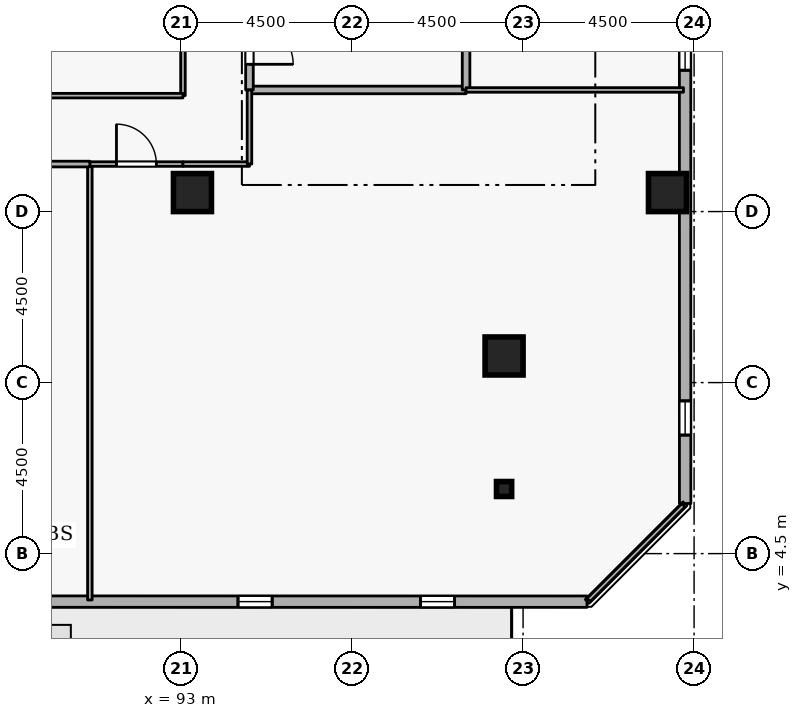
"""IFC4 building model, lengths in metres.
Left out: names, types, materials, properties, quantities, classifications, styles, units other than length and angle.
Written with IfcOpenShell. Run it as: python <this file> out.ifc"""

import sys

from ifc_helpers import new_model, si_unit, direction, frame, frame_2d, origin, origin_2d, place, context, subcontext, project, spatial, rectangle, i_section, extrude, element, fill, save


model = new_model("IFC4")
c1 = context("Model", 3, precision=1e-05, world=origin(), true_north=direction((0.0, 1.0)))
c2 = subcontext(c1, "Body", "Model", "MODEL_VIEW")
j1 = project(units=[si_unit("LENGTHUNIT", "METRE"), si_unit("PLANEANGLEUNIT", "RADIAN")], contexts=[c1])
p1 = place(None, origin())
s1 = spatial("IfcSite", under=j1, at=p1, CompositionType="ELEMENT")
p2 = place(p1, origin())
s2 = spatial("IfcBuilding", under=s1, at=p2, CompositionType="ELEMENT")
p3 = place(p2, frame((0.0, 0.0, 203.7)))
s3 = spatial("IfcBuildingStorey", under=s2, at=p3, CompositionType="ELEMENT", Elevation=203.7)
for number, where, z_axis, x_axis in (
    (1, (105.8, 14.0, 0.0), (0.0, 0.0, 1.0), (1.0, 0.0, 0.0)),
    (2, (101.5, 9.7, 0.0), (0.0, 0.0, 1.0), (1.0, 0.0, 0.0)),
    (3, (93.3, 14.0, 0.0), (0.0, 0.0, 1.0), (1.0, 0.0, 0.0)),
):
    element("IfcColumn", number, at=place(p3, frame(where, z_axis=z_axis, x_axis=x_axis)), inside=s3, PredefinedType="COLUMN", context=c2, shape_type="SweptSolid", body=[
        extrude(rectangle(XDim=1.0, YDim=1.0, at=origin_2d()), origin(), (0.0, 0.0, 1.0), 3.6),
    ])
p4 = place(p3, frame((101.5, 6.2, 0.0), z_axis=(0.0, 0.0, 1.0), x_axis=(1.0, 0.0, 0.0)))
e4 = element("IfcColumn", 4, at=p4, inside=s3, PredefinedType="COLUMN", context=c2, shape_type="SweptSolid", body=[
    extrude(i_section(OverallWidth=0.399, OverallDepth=0.394, WebThickness=0.023, FlangeThickness=0.037, FilletRadius=0.015, at=origin_2d()), origin(), (0.0, 0.0, 1.0), 3.6),
])
p5 = place(p3, frame((68.698, 3.24, 0.0), z_axis=(0.0, 0.0, 1.0), x_axis=(0.999999991209, -0.000132597301, 0.0)))
e5 = element("IfcWall", 5, at=p5, inside=s3, PredefinedType="STANDARD", context=c2, shape_type="SweptSolid", body=[
    extrude(rectangle(XDim=34.983, YDim=0.3, at=frame_2d((17.492, 0.0))), origin(), (0.0, 0.0, 1.0), 2.7),
])
p6 = place(p5, frame((19.292, 0.0, 0.0)))
e6 = element("IfcOpeningElement", 6, at=p6, cuts=e5, PredefinedType="OPENING", context=c2, shape_type="SweptSolid", body=[
    extrude(rectangle(XDim=1.0, YDim=2.08, at=frame_2d((0.5, 1.04))), frame((0.0, 0.16, 0.0), z_axis=(0.0, -1.0, 0.0), x_axis=(1.0, 0.0, 0.0)), (0.0, 0.0, 1.0), 0.32),
])
p7 = place(p5, frame((1.8, 0.0, 0.72)))
e7 = element("IfcOpeningElement", 7, at=p7, cuts=e5, PredefinedType="OPENING", context=c2, shape_type="SweptSolid", body=[
    extrude(rectangle(XDim=0.9, YDim=1.75, at=frame_2d((0.45, 0.875))), frame((0.0, 0.16, 0.0), z_axis=(0.0, -1.0, 0.0), x_axis=(1.0, 0.0, 0.0)), (0.0, 0.0, 1.0), 0.32),
])
p8 = place(p5, frame((6.6, 0.0, 0.72)))
e8 = element("IfcOpeningElement", 8, at=p8, cuts=e5, PredefinedType="OPENING", context=c2, shape_type="SweptSolid", body=[
    extrude(rectangle(XDim=0.9, YDim=1.75, at=frame_2d((0.45, 0.875))), frame((0.0, 0.16, 0.0), z_axis=(0.0, -1.0, 0.0), x_axis=(1.0, 0.0, 0.0)), (0.0, 0.0, 1.0), 0.32),
])
p9 = place(p5, frame((11.4, 0.0, 0.72)))
e9 = element("IfcOpeningElement", 9, at=p9, cuts=e5, PredefinedType="OPENING", context=c2, shape_type="SweptSolid", body=[
    extrude(rectangle(XDim=0.9, YDim=1.75, at=frame_2d((0.45, 0.875))), frame((0.0, 0.16, 0.0), z_axis=(0.0, -1.0, 0.0), x_axis=(1.0, 0.0, 0.0)), (0.0, 0.0, 1.0), 0.32),
])
p10 = place(p5, frame((16.2, 0.0, 0.72)))
e10 = element("IfcOpeningElement", 10, at=p10, cuts=e5, PredefinedType="OPENING", context=c2, shape_type="SweptSolid", body=[
    extrude(rectangle(XDim=0.9, YDim=1.75, at=frame_2d((0.45, 0.875))), frame((0.0, 0.16, 0.0), z_axis=(0.0, -1.0, 0.0), x_axis=(1.0, 0.0, 0.0)), (0.0, 0.0, 1.0), 0.32),
])
p11 = place(p5, frame((25.8, 0.0, 0.72)))
e11 = element("IfcOpeningElement", 11, at=p11, cuts=e5, PredefinedType="OPENING", context=c2, shape_type="SweptSolid", body=[
    extrude(rectangle(XDim=0.9, YDim=1.75, at=frame_2d((0.45, 0.875))), frame((0.0, 0.16, 0.0), z_axis=(0.0, -1.0, 0.0), x_axis=(1.0, 0.0, 0.0)), (0.0, 0.0, 1.0), 0.32),
])
p12 = place(p5, frame((30.6, 0.0, 0.72)))
e12 = element("IfcOpeningElement", 12, at=p12, cuts=e5, PredefinedType="OPENING", context=c2, shape_type="SweptSolid", body=[
    extrude(rectangle(XDim=0.9, YDim=1.75, at=frame_2d((0.45, 0.875))), frame((0.0, 0.16, 0.0), z_axis=(0.0, -1.0, 0.0), x_axis=(1.0, 0.0, 0.0)), (0.0, 0.0, 1.0), 0.32),
])
p13 = place(p3, frame((106.265, 5.819, 0.0), z_axis=(0.0, 0.0, 1.0), x_axis=(-0.000132597301, 0.999999991209, 0.0)))
e13 = element("IfcWall", 13, at=p13, inside=s3, PredefinedType="STANDARD", context=c2, shape_type="SweptSolid", body=[
    extrude(rectangle(XDim=34.983, YDim=0.3, at=frame_2d((17.492, 0.0))), origin(), (0.0, 0.0, 1.0), 2.7),
])
p14 = place(p13, frame((1.8, 0.0, 0.72)))
e14 = element("IfcOpeningElement", 14, at=p14, cuts=e13, PredefinedType="OPENING", context=c2, shape_type="SweptSolid", body=[
    extrude(rectangle(XDim=0.9, YDim=1.75, at=frame_2d((0.45, 0.875))), frame((0.0, 0.16, 0.0), z_axis=(0.0, -1.0, 0.0), x_axis=(1.0, 0.0, 0.0)), (0.0, 0.0, 1.0), 0.32),
])
p15 = place(p13, frame((11.4, 0.0, 0.72)))
e15 = element("IfcOpeningElement", 15, at=p15, cuts=e13, PredefinedType="OPENING", context=c2, shape_type="SweptSolid", body=[
    extrude(rectangle(XDim=0.9, YDim=1.75, at=frame_2d((0.45, 0.875))), frame((0.0, 0.16, 0.0), z_axis=(0.0, -1.0, 0.0), x_axis=(1.0, 0.0, 0.0)), (0.0, 0.0, 1.0), 0.32),
])
p16 = place(p13, frame((16.2, 0.0, 0.72)))
e16 = element("IfcOpeningElement", 16, at=p16, cuts=e13, PredefinedType="OPENING", context=c2, shape_type="SweptSolid", body=[
    extrude(rectangle(XDim=0.9, YDim=1.75, at=frame_2d((0.45, 0.875))), frame((0.0, 0.16, 0.0), z_axis=(0.0, -1.0, 0.0), x_axis=(1.0, 0.0, 0.0)), (0.0, 0.0, 1.0), 0.32),
])
p17 = place(p13, frame((25.8, 0.0, 0.72)))
e17 = element("IfcOpeningElement", 17, at=p17, cuts=e13, PredefinedType="OPENING", context=c2, shape_type="SweptSolid", body=[
    extrude(rectangle(XDim=0.9, YDim=1.75, at=frame_2d((0.45, 0.875))), frame((0.0, 0.16, 0.0), z_axis=(0.0, -1.0, 0.0), x_axis=(1.0, 0.0, 0.0)), (0.0, 0.0, 1.0), 0.32),
])
p18 = place(p3, frame((94.8, 16.7, 0.0), z_axis=(0.0, 0.0, 1.0), x_axis=(1.0, 0.0, 0.0)))
e18 = element("IfcWall", 18, at=p18, inside=s3, PredefinedType="STANDARD", context=c2, shape_type="SweptSolid", body=[
    extrude(rectangle(XDim=5.7, YDim=0.2, at=frame_2d((2.85, 0.0))), origin(), (0.0, 0.0, 1.0), 3.34),
])
p19 = place(p3, frame((100.5, 16.7, 0.0), z_axis=(0.0, 0.0, 1.0), x_axis=(0.0, 1.0, 0.0)))
e19 = element("IfcWall", 19, at=p19, inside=s3, PredefinedType="STANDARD", context=c2, shape_type="SweptSolid", body=[
    extrude(rectangle(XDim=2.5, YDim=0.2, at=frame_2d((1.25, 0.0))), origin(), (0.0, 0.0, 1.0), 3.34),
])
p20 = place(p3, frame((94.8, 19.2, 0.0), z_axis=(0.0, 0.0, 1.0), x_axis=(0.0, -1.0, 0.0)))
e20 = element("IfcWall", 20, at=p20, inside=s3, PredefinedType="STANDARD", context=c2, shape_type="SweptSolid", body=[
    extrude(rectangle(XDim=2.5, YDim=0.2, at=frame_2d((1.25, 0.0))), origin(), (0.0, 0.0, 1.0), 3.34),
])
p21 = place(p20, frame((0.675, 0.0, 0.0)))
e21 = element("IfcOpeningElement", 21, at=p21, cuts=e20, PredefinedType="OPENING", context=c2, shape_type="SweptSolid", body=[
    extrude(rectangle(XDim=1.15, YDim=2.1, at=frame_2d((0.575, 1.05))), frame((0.0, 0.11, 0.0), z_axis=(0.0, -1.0, 0.0), x_axis=(1.0, 0.0, 0.0)), (0.0, 0.0, 1.0), 0.22),
])
p22 = place(p3, frame((90.6, 3.28, 0.0), z_axis=(0.0, 0.0, 1.0), x_axis=(0.0, 1.0, 0.0)))
e22 = element("IfcWall", 22, at=p22, inside=s3, PredefinedType="PARTITIONING", context=c2, shape_type="SweptSolid", body=[
    extrude(rectangle(XDim=11.47, YDim=0.12, at=frame_2d((5.735, 0.0))), origin(), (0.0, 0.0, 1.0), 3.34),
])
p23 = place(p3, frame((90.6, 14.75, 0.0), z_axis=(0.0, 0.0, 1.0), x_axis=(1.0, 0.0, 0.0)))
e23 = element("IfcWall", 23, at=p23, inside=s3, PredefinedType="PARTITIONING", context=c2, shape_type="SweptSolid", body=[
    extrude(rectangle(XDim=2.45, YDim=0.12, at=frame_2d((1.225, 0.0))), origin(), (0.0, 0.0, 1.0), 3.34),
])
p24 = place(p23, frame((0.7, 0.0, 0.0)))
e24 = element("IfcOpeningElement", 24, at=p24, cuts=e23, PredefinedType="OPENING", context=c2, shape_type="SweptSolid", body=[
    extrude(rectangle(XDim=1.05, YDim=2.1, at=frame_2d((0.525, 1.05))), frame((0.0, 0.07, 0.0), z_axis=(0.0, -1.0, 0.0), x_axis=(1.0, 0.0, 0.0)), (0.0, 0.0, 1.0), 0.14),
])
p25 = place(p3, frame((93.05, 14.75, 0.0), z_axis=(0.0, 0.0, 1.0), x_axis=(1.0, 0.0, 0.0)))
e25 = element("IfcWall", 25, at=p25, inside=s3, PredefinedType="PARTITIONING", context=c2, shape_type="SweptSolid", body=[
    extrude(rectangle(XDim=1.75, YDim=0.12, at=frame_2d((0.875, 0.0))), origin(), (0.0, 0.0, 1.0), 3.34),
])
p26 = place(p3, frame((94.8, 14.75, 0.0), z_axis=(0.0, 0.0, 1.0), x_axis=(0.0, 1.0, 0.0)))
e26 = element("IfcWall", 26, at=p26, inside=s3, PredefinedType="PARTITIONING", context=c2, shape_type="SweptSolid", body=[
    extrude(rectangle(XDim=1.95, YDim=0.12, at=frame_2d((0.975, 0.0))), origin(), (0.0, 0.0, 1.0), 3.34),
])
p27 = place(p3, frame((100.5, 16.7, 0.0), z_axis=(0.0, 0.0, 1.0), x_axis=(1.0, 0.0, 0.0)))
e27 = element("IfcWall", 27, at=p27, inside=s3, PredefinedType="PARTITIONING", context=c2, shape_type="SweptSolid", body=[
    extrude(rectangle(XDim=5.72, YDim=0.12, at=frame_2d((2.86, 0.0))), origin(), (0.0, 0.0, 1.0), 3.34),
])
p28 = place(p3, frame((106.22, 5.775, 0.0), z_axis=(0.0, 0.0, 1.0), x_axis=(-0.707106781187, -0.707106781187, 0.0)))
e28 = element("IfcWall", 28, at=p28, inside=s3, PredefinedType="PARTITIONING", context=c2, shape_type="SweptSolid", body=[
    extrude(rectangle(XDim=3.528, YDim=0.12, at=frame_2d((1.764, 0.0))), origin(), (0.0, 0.0, 1.0), 3.34),
])
p29 = place(p3, frame((86.4, 14.75, 0.0), z_axis=(0.0, 0.0, 1.0), x_axis=(1.0, 0.0, 0.0)))
e29 = element("IfcWall", 29, at=p29, inside=s3, PredefinedType="PARTITIONING", context=c2, shape_type="SweptSolid", body=[
    extrude(rectangle(XDim=4.2, YDim=0.15, at=frame_2d((2.1, 0.0))), origin(), (0.0, 0.0, 1.0), 3.34),
])
p30 = place(p29, frame((1.45, 0.0, 0.0)))
e30 = element("IfcOpeningElement", 30, at=p30, cuts=e29, PredefinedType="OPENING", context=c2, shape_type="SweptSolid", body=[
    extrude(rectangle(XDim=1.3, YDim=2.12, at=frame_2d((0.65, 1.06))), frame((0.0, 0.085, 0.0), z_axis=(0.0, -1.0, 0.0), x_axis=(1.0, 0.0, 0.0)), (0.0, 0.0, 1.0), 0.17),
])
p31 = place(p3, frame((93.05, 22.4, 0.0), z_axis=(0.0, 0.0, 1.0), x_axis=(0.0, -1.0, 0.0)))
e31 = element("IfcWall", 31, at=p31, inside=s3, PredefinedType="PARTITIONING", context=c2, shape_type="SweptSolid", body=[
    extrude(rectangle(XDim=5.85, YDim=0.12, at=frame_2d((2.925, 0.0))), origin(), (0.0, 0.0, 1.0), 3.34),
])
p32 = place(p3, frame((93.05, 16.55, 0.0), z_axis=(0.0, 0.0, 1.0), x_axis=(-1.0, 0.0, 0.0)))
e32 = element("IfcWall", 32, at=p32, inside=s3, PredefinedType="PARTITIONING", context=c2, shape_type="SweptSolid", body=[
    extrude(rectangle(XDim=9.1, YDim=0.12, at=frame_2d((4.55, 0.0))), origin(), (0.0, 0.0, 1.0), 3.34),
])
p33 = place(p32, frame((4.075, 0.0, 0.0)))
e33 = element("IfcOpeningElement", 33, at=p33, cuts=e32, PredefinedType="OPENING", context=c2, shape_type="SweptSolid", body=[
    extrude(rectangle(XDim=0.95, YDim=2.1, at=frame_2d((0.475, 1.05))), frame((0.0, 0.07, 0.0), z_axis=(0.0, -1.0, 0.0), x_axis=(1.0, 0.0, 0.0)), (0.0, 0.0, 1.0), 0.14),
])
p34 = place(p11, origin())
e34 = element("IfcWindow", 34, at=p34, inside=s3, PartitioningType="SINGLE_PANEL", PredefinedType="WINDOW", context=c2, shape_type="SweptSolid", body=[
    extrude(rectangle(XDim=0.9, YDim=1.75, at=frame_2d((0.45, 0.875))), frame((0.0, 0.03, 0.0), z_axis=(0.0, -1.0, 0.0), x_axis=(1.0, 0.0, 0.0)), (0.0, 0.0, 1.0), 0.06),
])
fill(e11, e34)
p35 = place(p12, origin())
e35 = element("IfcWindow", 35, at=p35, inside=s3, PartitioningType="SINGLE_PANEL", PredefinedType="WINDOW", context=c2, shape_type="SweptSolid", body=[
    extrude(rectangle(XDim=0.9, YDim=1.75, at=frame_2d((0.45, 0.875))), frame((0.0, 0.03, 0.0), z_axis=(0.0, -1.0, 0.0), x_axis=(1.0, 0.0, 0.0)), (0.0, 0.0, 1.0), 0.06),
])
fill(e12, e35)
p36 = place(p14, origin())
e36 = element("IfcWindow", 36, at=p36, inside=s3, PartitioningType="SINGLE_PANEL", PredefinedType="WINDOW", context=c2, shape_type="SweptSolid", body=[
    extrude(rectangle(XDim=0.9, YDim=1.75, at=frame_2d((0.45, 0.875))), frame((0.0, 0.03, 0.0), z_axis=(0.0, -1.0, 0.0), x_axis=(1.0, 0.0, 0.0)), (0.0, 0.0, 1.0), 0.06),
])
fill(e14, e36)
p37 = place(p15, origin())
e37 = element("IfcWindow", 37, at=p37, inside=s3, PartitioningType="SINGLE_PANEL", PredefinedType="WINDOW", context=c2, shape_type="SweptSolid", body=[
    extrude(rectangle(XDim=0.9, YDim=1.75, at=frame_2d((0.45, 0.875))), frame((0.0, 0.03, 0.0), z_axis=(0.0, -1.0, 0.0), x_axis=(1.0, 0.0, 0.0)), (0.0, 0.0, 1.0), 0.06),
])
fill(e15, e37)
p38 = place(p21, origin())
e38 = element("IfcDoor", 38, at=p38, inside=s3, OperationType="SINGLE_SWING_RIGHT", PredefinedType="DOOR", context=c2, shape_type="SweptSolid", body=[
    extrude(rectangle(XDim=1.15, YDim=2.1, at=frame_2d((0.575, 1.05))), frame((0.0, 0.025, 0.0), z_axis=(0.0, -1.0, 0.0), x_axis=(1.0, 0.0, 0.0)), (0.0, 0.0, 1.0), 0.05),
])
fill(e21, e38)
p39 = place(p24, origin())
e39 = element("IfcDoor", 39, at=p39, inside=s3, OperationType="SINGLE_SWING_LEFT", PredefinedType="DOOR", context=c2, shape_type="SweptSolid", body=[
    extrude(rectangle(XDim=1.05, YDim=2.1, at=frame_2d((0.525, 1.05))), frame((0.0, 0.025, 0.0), z_axis=(0.0, -1.0, 0.0), x_axis=(1.0, 0.0, 0.0)), (0.0, 0.0, 1.0), 0.05),
])
fill(e24, e39)
save(model, sys.argv[1])
